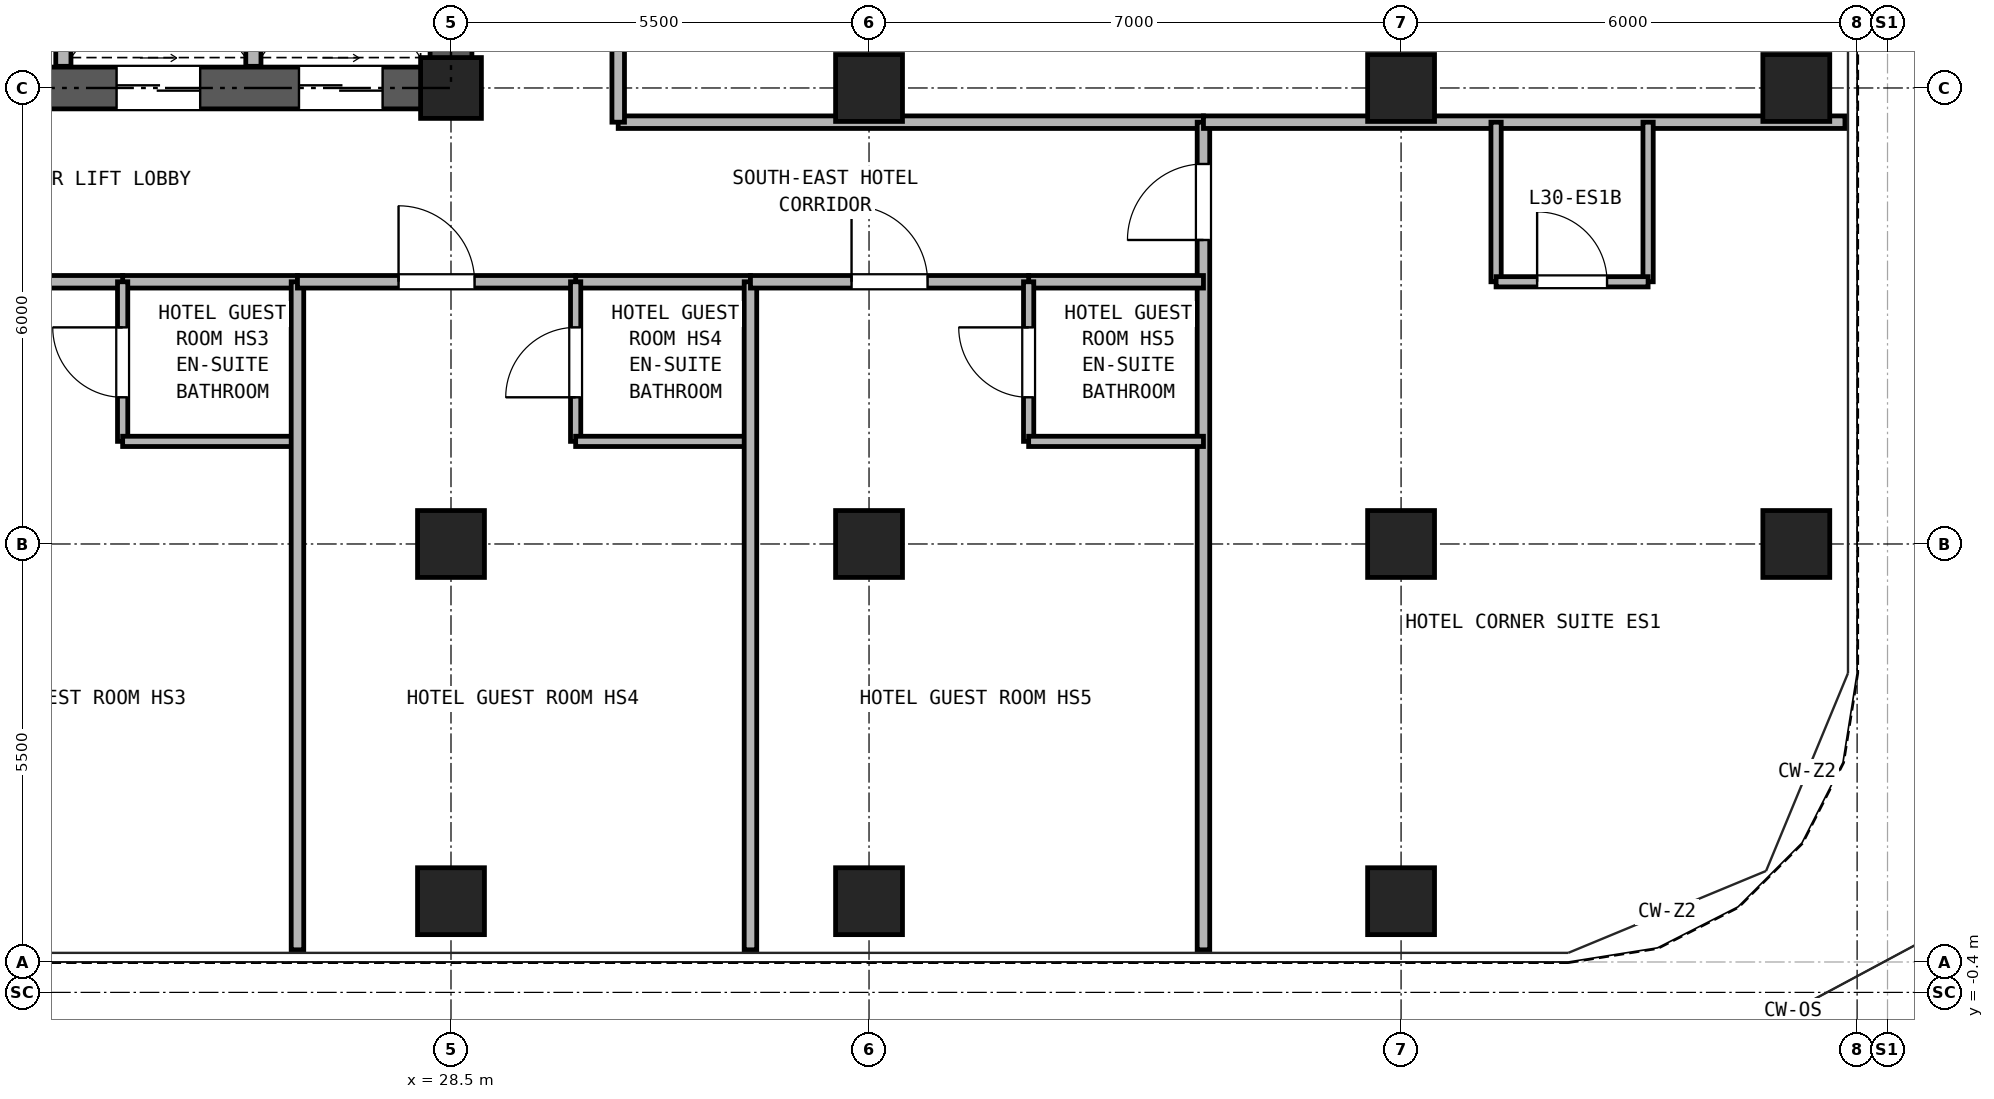
"""IFC4 building model, lengths in metres.
Left out: names, types, materials, properties, quantities, classifications, styles, units other than length and angle.
Written with IfcOpenShell. Run it as: python <this file> out.ifc"""

import sys

from ifc_helpers import new_model, si_unit, direction, frame, frame_2d, origin, origin_2d, place, context, subcontext, project, spatial, rectangle, hollow_rectangle, extrude, source, transform, mapped, element, fill, save


model = new_model("IFC4")
c1 = context("Model", 3, precision=1e-05, world=origin(), true_north=direction((0.0, 1.0)))
c2 = subcontext(c1, "Body", "Model", "MODEL_VIEW")
j1 = project(units=[si_unit("LENGTHUNIT", "METRE"), si_unit("PLANEANGLEUNIT", "RADIAN")], contexts=[c1])
p1 = place(None, origin())
s1 = spatial("IfcSite", under=j1, at=p1, CompositionType="ELEMENT")
p2 = place(p1, origin())
s2 = spatial("IfcBuilding", under=s1, at=p2, CompositionType="ELEMENT")
p3 = place(p2, frame((0.0, 0.0, 111.9)))
s3 = spatial("IfcBuildingStorey", under=s2, at=p3, CompositionType="ELEMENT", Elevation=111.9)
m1 = source(origin(), c2, "Body", "SweptSolid", [
    extrude(hollow_rectangle(XDim=0.88, YDim=0.88, WallThickness=0.05, at=origin_2d()), origin(), (0.0, 0.0, 1.0), 2.95),
])
for number, where, z_axis, x_axis in (
    (1, (28.5, 0.8, 0.0), (0.0, 0.0, 1.0), (1.0, 0.0, 0.0)),
    (2, (34.0, 0.8, 0.0), (0.0, 0.0, 1.0), (1.0, 0.0, 0.0)),
    (3, (41.0, 0.8, 0.0), (0.0, 0.0, 1.0), (1.0, 0.0, 0.0)),
    (4, (46.2, 5.5, 0.0), (0.0, 0.0, 1.0), (1.0, 0.0, 0.0)),
    (5, (46.2, 11.5, 0.0), (0.0, 0.0, 1.0), (1.0, 0.0, 0.0)),
    (6, (28.5, 5.5, 0.0), (0.0, 0.0, 1.0), (1.0, 0.0, 0.0)),
):
    element("IfcColumn", number, at=place(p3, frame(where, z_axis=z_axis, x_axis=x_axis)), inside=s3, PredefinedType="COLUMN", context=c2, shape_type="MappedRepresentation", body=[
        mapped(m1, transform((0.0, 0.0, 0.0), x_axis=(1.0, 0.0, 0.0), y_axis=(0.0, 1.0, 0.0), z_axis=(0.0, 0.0, 1.0), scale=1.0)),
    ])
m2 = source(origin(), c2, "Body", "SweptSolid", [
    extrude(hollow_rectangle(XDim=0.8, YDim=0.8, WallThickness=0.045, at=origin_2d()), origin(), (0.0, 0.0, 1.0), 2.95),
])
p4 = place(p3, frame((28.5, 11.5, 0.0), z_axis=(0.0, 0.0, 1.0), x_axis=(1.0, 0.0, 0.0)))
e7 = element("IfcColumn", 7, at=p4, inside=s3, PredefinedType="COLUMN", context=c2, shape_type="MappedRepresentation", body=[
    mapped(m2, transform((0.0, 0.0, 0.0), x_axis=(1.0, 0.0, 0.0), y_axis=(0.0, 1.0, 0.0), z_axis=(0.0, 0.0, 1.0), scale=1.0)),
])
for number, where, z_axis, x_axis in (
    (8, (34.0, 5.5, 0.0), (0.0, 0.0, 1.0), (1.0, 0.0, 0.0)),
    (9, (34.0, 11.5, 0.0), (0.0, 0.0, 1.0), (1.0, 0.0, 0.0)),
    (10, (41.0, 5.5, 0.0), (0.0, 0.0, 1.0), (1.0, 0.0, 0.0)),
    (11, (41.0, 11.5, 0.0), (0.0, 0.0, 1.0), (1.0, 0.0, 0.0)),
):
    element("IfcColumn", number, at=place(p3, frame(where, z_axis=z_axis, x_axis=x_axis)), inside=s3, PredefinedType="COLUMN", context=c2, shape_type="MappedRepresentation", body=[
        mapped(m1, transform((0.0, 0.0, 0.0), x_axis=(1.0, 0.0, 0.0), y_axis=(0.0, 1.0, 0.0), z_axis=(0.0, 0.0, 1.0), scale=1.0)),
    ])
p5 = place(p3, frame((18.225, 11.5, 0.0), z_axis=(0.0, 0.0, 1.0), x_axis=(1.0, 0.0, 0.0)))
e12 = element("IfcWall", 12, at=p5, inside=s3, PredefinedType="SHEAR", context=c2, shape_type="SweptSolid", body=[
    extrude(rectangle(XDim=10.55, YDim=0.55, at=frame_2d((5.275, 0.0))), origin(), (0.0, 0.0, 1.0), 2.95),
])
p6 = place(p5, frame((2.375, 0.0, 0.0)))
e13 = element("IfcOpeningElement", 13, at=p6, cuts=e12, PredefinedType="OPENING", context=c2, shape_type="SweptSolid", body=[
    extrude(rectangle(XDim=0.95, YDim=2.15, at=frame_2d((0.475, 1.075))), frame((0.0, 0.285, 0.0), z_axis=(0.0, -1.0, 0.0), x_axis=(1.0, 0.0, 0.0)), (0.0, 0.0, 1.0), 0.57),
])
p7 = place(p5, frame((5.875, 0.0, 0.0)))
e14 = element("IfcOpeningElement", 14, at=p7, cuts=e12, PredefinedType="OPENING", context=c2, shape_type="SweptSolid", body=[
    extrude(rectangle(XDim=1.1, YDim=2.25, at=frame_2d((0.55, 1.125))), frame((0.0, 0.285, 0.0), z_axis=(0.0, -1.0, 0.0), x_axis=(1.0, 0.0, 0.0)), (0.0, 0.0, 1.0), 0.57),
])
p8 = place(p5, frame((8.275, 0.0, 0.0)))
e15 = element("IfcOpeningElement", 15, at=p8, cuts=e12, PredefinedType="OPENING", context=c2, shape_type="SweptSolid", body=[
    extrude(rectangle(XDim=1.1, YDim=2.25, at=frame_2d((0.55, 1.125))), frame((0.0, 0.285, 0.0), z_axis=(0.0, -1.0, 0.0), x_axis=(1.0, 0.0, 0.0)), (0.0, 0.0, 1.0), 0.57),
])
p9 = place(p3, frame((28.5, 11.775, 0.0), z_axis=(0.0, 0.0, 1.0), x_axis=(0.0, 1.0, 0.0)))
e16 = element("IfcWall", 16, at=p9, inside=s3, PredefinedType="SHEAR", context=c2, shape_type="SweptSolid", body=[
    extrude(rectangle(XDim=16.7, YDim=0.55, at=frame_2d((8.35, 0.0))), origin(), (0.0, 0.0, 1.0), 2.95),
])
p10 = place(p9, frame((7.375, 0.0, 0.0)))
e17 = element("IfcOpeningElement", 17, at=p10, cuts=e16, PredefinedType="OPENING", context=c2, shape_type="SweptSolid", body=[
    extrude(rectangle(XDim=1.15, YDim=2.2, at=frame_2d((0.575, 1.1))), frame((0.0, 0.285, 0.0), z_axis=(0.0, -1.0, 0.0), x_axis=(1.0, 0.0, 0.0)), (0.0, 0.0, 1.0), 0.57),
])
for number, where, z_axis, x_axis in (
    (18, (23.4, 11.785, 0.0), (0.0, 0.0, 1.0), (0.0, 1.0, 0.0)),
    (19, (25.9, 11.785, 0.0), (0.0, 0.0, 1.0), (0.0, 1.0, 0.0)),
):
    element("IfcWall", number, at=place(p3, frame(where, z_axis=z_axis, x_axis=x_axis)), inside=s3, PredefinedType="PARTITIONING", context=c2, shape_type="SweptSolid", body=[
        extrude(rectangle(XDim=3.215, YDim=0.2, at=frame_2d((1.607, 0.0))), origin(), (0.0, 0.0, 1.0), 2.95),
    ])
p11 = place(p3, frame((30.7, 11.05, 0.0), z_axis=(0.0, 0.0, 1.0), x_axis=(1.0, 0.0, 0.0)))
e20 = element("IfcWall", 20, at=p11, inside=s3, PredefinedType="PARTITIONING", context=c2, shape_type="SweptSolid", body=[
    extrude(rectangle(XDim=7.7, YDim=0.165, at=frame_2d((3.85, 0.0))), origin(), (0.0, 0.0, 1.0), 2.95),
])
p12 = place(p3, frame((30.7, 11.05, 0.0), z_axis=(0.0, 0.0, 1.0), x_axis=(0.0, 1.0, 0.0)))
e21 = element("IfcWall", 21, at=p12, inside=s3, PredefinedType="PARTITIONING", context=c2, shape_type="SweptSolid", body=[
    extrude(rectangle(XDim=18.15, YDim=0.165, at=frame_2d((9.075, 0.0))), origin(), (0.0, 0.0, 1.0), 2.95),
])
p13 = place(p12, frame((8.575, 0.0, 0.0)))
e22 = element("IfcOpeningElement", 22, at=p13, cuts=e21, PredefinedType="OPENING", context=c2, shape_type="SweptSolid", body=[
    extrude(rectangle(XDim=0.95, YDim=2.15, at=frame_2d((0.475, 1.075))), frame((0.0, 0.093, 0.0), z_axis=(0.0, -1.0, 0.0), x_axis=(1.0, 0.0, 0.0)), (0.0, 0.0, 1.0), 0.185),
])
p14 = place(p3, frame((38.4, 0.16, 0.0), z_axis=(0.0, 0.0, 1.0), x_axis=(0.0, 1.0, 0.0)))
e23 = element("IfcWall", 23, at=p14, inside=s3, PredefinedType="PARTITIONING", context=c2, shape_type="SweptSolid", body=[
    extrude(rectangle(XDim=10.89, YDim=0.165, at=frame_2d((5.445, 0.0))), origin(), (0.0, 0.0, 1.0), 2.95),
])
p15 = place(p14, frame((9.34, 0.0, 0.0)))
e24 = element("IfcOpeningElement", 24, at=p15, cuts=e23, PredefinedType="OPENING", context=c2, shape_type="SweptSolid", body=[
    extrude(rectangle(XDim=1.0, YDim=2.15, at=frame_2d((0.5, 1.075))), frame((0.0, 0.093, 0.0), z_axis=(0.0, -1.0, 0.0), x_axis=(1.0, 0.0, 0.0)), (0.0, 0.0, 1.0), 0.185),
])
p16 = place(p3, frame((38.4, 11.05, 0.0), z_axis=(0.0, 0.0, 1.0), x_axis=(1.0, 0.0, 0.0)))
e25 = element("IfcWall", 25, at=p16, inside=s3, PredefinedType="PARTITIONING", context=c2, shape_type="SweptSolid", body=[
    extrude(rectangle(XDim=8.44, YDim=0.165, at=frame_2d((4.22, 0.0))), origin(), (0.0, 0.0, 1.0), 2.95),
])
for number, where, z_axis, x_axis in (
    (26, (42.25, 8.95, 0.0), (0.0, 0.0, 1.0), (0.0, 1.0, 0.0)),
    (27, (44.25, 8.95, 0.0), (0.0, 0.0, 1.0), (0.0, 1.0, 0.0)),
):
    element("IfcWall", number, at=place(p3, frame(where, z_axis=z_axis, x_axis=x_axis)), inside=s3, PredefinedType="PARTITIONING", context=c2, shape_type="SweptSolid", body=[
        extrude(rectangle(XDim=2.1, YDim=0.135, at=frame_2d((1.05, 0.0))), origin(), (0.0, 0.0, 1.0), 2.95),
    ])
p17 = place(p3, frame((42.25, 8.95, 0.0), z_axis=(0.0, 0.0, 1.0), x_axis=(1.0, 0.0, 0.0)))
e28 = element("IfcWall", 28, at=p17, inside=s3, PredefinedType="PARTITIONING", context=c2, shape_type="SweptSolid", body=[
    extrude(rectangle(XDim=2.0, YDim=0.135, at=frame_2d((1.0, 0.0))), origin(), (0.0, 0.0, 1.0), 2.95),
])
p18 = place(p17, frame((0.54, 0.0, 0.0)))
e29 = element("IfcOpeningElement", 29, at=p18, cuts=e28, PredefinedType="OPENING", context=c2, shape_type="SweptSolid", body=[
    extrude(rectangle(XDim=0.92, YDim=2.1, at=frame_2d((0.46, 1.05))), frame((0.0, 0.077, 0.0), z_axis=(0.0, -1.0, 0.0), x_axis=(1.0, 0.0, 0.0)), (0.0, 0.0, 1.0), 0.155),
])
p19 = place(p3, frame((24.18, 8.95, 0.0), z_axis=(0.0, 0.0, 1.0), x_axis=(1.0, 0.0, 0.0)))
e30 = element("IfcWall", 30, at=p19, inside=s3, PredefinedType="PARTITIONING", context=c2, shape_type="SweptSolid", body=[
    extrude(rectangle(XDim=2.3, YDim=0.165, at=frame_2d((1.15, 0.0))), origin(), (0.0, 0.0, 1.0), 2.95),
])
p20 = place(p3, frame((20.52, 8.95, 0.0), z_axis=(0.0, 0.0, 1.0), x_axis=(1.0, 0.0, 0.0)))
e31 = element("IfcWall", 31, at=p20, inside=s3, PredefinedType="PARTITIONING", context=c2, shape_type="SweptSolid", body=[
    extrude(rectangle(XDim=3.66, YDim=0.165, at=frame_2d((1.83, 0.0))), origin(), (0.0, 0.0, 1.0), 2.95),
])
p21 = place(p20, frame((1.33, 0.0, 0.0)))
e32 = element("IfcOpeningElement", 32, at=p21, cuts=e31, PredefinedType="OPENING", context=c2, shape_type="SweptSolid", body=[
    extrude(rectangle(XDim=1.0, YDim=2.15, at=frame_2d((0.5, 1.075))), frame((0.0, 0.093, 0.0), z_axis=(0.0, -1.0, 0.0), x_axis=(1.0, 0.0, 0.0)), (0.0, 0.0, 1.0), 0.185),
])
p22 = place(p3, frame((24.18, 6.85, 0.0), z_axis=(0.0, 0.0, 1.0), x_axis=(0.0, 1.0, 0.0)))
e33 = element("IfcWall", 33, at=p22, inside=s3, PredefinedType="PARTITIONING", context=c2, shape_type="SweptSolid", body=[
    extrude(rectangle(XDim=2.1, YDim=0.135, at=frame_2d((1.05, 0.0))), origin(), (0.0, 0.0, 1.0), 2.95),
])
p23 = place(p22, frame((0.58, 0.0, 0.0)))
e34 = element("IfcOpeningElement", 34, at=p23, cuts=e33, PredefinedType="OPENING", context=c2, shape_type="SweptSolid", body=[
    extrude(rectangle(XDim=0.92, YDim=2.1, at=frame_2d((0.46, 1.05))), frame((0.0, 0.077, 0.0), z_axis=(0.0, -1.0, 0.0), x_axis=(1.0, 0.0, 0.0)), (0.0, 0.0, 1.0), 0.155),
])
p24 = place(p3, frame((24.18, 6.85, 0.0), z_axis=(0.0, 0.0, 1.0), x_axis=(1.0, 0.0, 0.0)))
e35 = element("IfcWall", 35, at=p24, inside=s3, PredefinedType="PARTITIONING", context=c2, shape_type="SweptSolid", body=[
    extrude(rectangle(XDim=2.3, YDim=0.135, at=frame_2d((1.15, 0.0))), origin(), (0.0, 0.0, 1.0), 2.95),
])
p25 = place(p3, frame((26.48, 0.16, 0.0), z_axis=(0.0, 0.0, 1.0), x_axis=(0.0, 1.0, 0.0)))
e36 = element("IfcWall", 36, at=p25, inside=s3, PredefinedType="PARTITIONING", context=c2, shape_type="SweptSolid", body=[
    extrude(rectangle(XDim=8.79, YDim=0.165, at=frame_2d((4.395, 0.0))), origin(), (0.0, 0.0, 1.0), 2.95),
])
p26 = place(p3, frame((30.14, 8.95, 0.0), z_axis=(0.0, 0.0, 1.0), x_axis=(1.0, 0.0, 0.0)))
e37 = element("IfcWall", 37, at=p26, inside=s3, PredefinedType="PARTITIONING", context=c2, shape_type="SweptSolid", body=[
    extrude(rectangle(XDim=2.3, YDim=0.165, at=frame_2d((1.15, 0.0))), origin(), (0.0, 0.0, 1.0), 2.95),
])
p27 = place(p3, frame((26.48, 8.95, 0.0), z_axis=(0.0, 0.0, 1.0), x_axis=(1.0, 0.0, 0.0)))
e38 = element("IfcWall", 38, at=p27, inside=s3, PredefinedType="PARTITIONING", context=c2, shape_type="SweptSolid", body=[
    extrude(rectangle(XDim=3.66, YDim=0.165, at=frame_2d((1.83, 0.0))), origin(), (0.0, 0.0, 1.0), 2.95),
])
p28 = place(p27, frame((1.33, 0.0, 0.0)))
e39 = element("IfcOpeningElement", 39, at=p28, cuts=e38, PredefinedType="OPENING", context=c2, shape_type="SweptSolid", body=[
    extrude(rectangle(XDim=1.0, YDim=2.15, at=frame_2d((0.5, 1.075))), frame((0.0, 0.093, 0.0), z_axis=(0.0, -1.0, 0.0), x_axis=(1.0, 0.0, 0.0)), (0.0, 0.0, 1.0), 0.185),
])
p29 = place(p3, frame((30.14, 6.85, 0.0), z_axis=(0.0, 0.0, 1.0), x_axis=(0.0, 1.0, 0.0)))
e40 = element("IfcWall", 40, at=p29, inside=s3, PredefinedType="PARTITIONING", context=c2, shape_type="SweptSolid", body=[
    extrude(rectangle(XDim=2.1, YDim=0.135, at=frame_2d((1.05, 0.0))), origin(), (0.0, 0.0, 1.0), 2.95),
])
p30 = place(p29, frame((0.58, 0.0, 0.0)))
e41 = element("IfcOpeningElement", 41, at=p30, cuts=e40, PredefinedType="OPENING", context=c2, shape_type="SweptSolid", body=[
    extrude(rectangle(XDim=0.92, YDim=2.1, at=frame_2d((0.46, 1.05))), frame((0.0, 0.077, 0.0), z_axis=(0.0, -1.0, 0.0), x_axis=(1.0, 0.0, 0.0)), (0.0, 0.0, 1.0), 0.155),
])
p31 = place(p3, frame((30.14, 6.85, 0.0), z_axis=(0.0, 0.0, 1.0), x_axis=(1.0, 0.0, 0.0)))
e42 = element("IfcWall", 42, at=p31, inside=s3, PredefinedType="PARTITIONING", context=c2, shape_type="SweptSolid", body=[
    extrude(rectangle(XDim=2.3, YDim=0.135, at=frame_2d((1.15, 0.0))), origin(), (0.0, 0.0, 1.0), 2.95),
])
p32 = place(p3, frame((32.44, 0.16, 0.0), z_axis=(0.0, 0.0, 1.0), x_axis=(0.0, 1.0, 0.0)))
e43 = element("IfcWall", 43, at=p32, inside=s3, PredefinedType="PARTITIONING", context=c2, shape_type="SweptSolid", body=[
    extrude(rectangle(XDim=8.79, YDim=0.165, at=frame_2d((4.395, 0.0))), origin(), (0.0, 0.0, 1.0), 2.95),
])
p33 = place(p3, frame((36.1, 8.95, 0.0), z_axis=(0.0, 0.0, 1.0), x_axis=(1.0, 0.0, 0.0)))
e44 = element("IfcWall", 44, at=p33, inside=s3, PredefinedType="PARTITIONING", context=c2, shape_type="SweptSolid", body=[
    extrude(rectangle(XDim=2.3, YDim=0.165, at=frame_2d((1.15, 0.0))), origin(), (0.0, 0.0, 1.0), 2.95),
])
p34 = place(p3, frame((32.44, 8.95, 0.0), z_axis=(0.0, 0.0, 1.0), x_axis=(1.0, 0.0, 0.0)))
e45 = element("IfcWall", 45, at=p34, inside=s3, PredefinedType="PARTITIONING", context=c2, shape_type="SweptSolid", body=[
    extrude(rectangle(XDim=3.66, YDim=0.165, at=frame_2d((1.83, 0.0))), origin(), (0.0, 0.0, 1.0), 2.95),
])
p35 = place(p34, frame((1.33, 0.0, 0.0)))
e46 = element("IfcOpeningElement", 46, at=p35, cuts=e45, PredefinedType="OPENING", context=c2, shape_type="SweptSolid", body=[
    extrude(rectangle(XDim=1.0, YDim=2.15, at=frame_2d((0.5, 1.075))), frame((0.0, 0.093, 0.0), z_axis=(0.0, -1.0, 0.0), x_axis=(1.0, 0.0, 0.0)), (0.0, 0.0, 1.0), 0.185),
])
p36 = place(p3, frame((36.1, 6.85, 0.0), z_axis=(0.0, 0.0, 1.0), x_axis=(0.0, 1.0, 0.0)))
e47 = element("IfcWall", 47, at=p36, inside=s3, PredefinedType="PARTITIONING", context=c2, shape_type="SweptSolid", body=[
    extrude(rectangle(XDim=2.1, YDim=0.135, at=frame_2d((1.05, 0.0))), origin(), (0.0, 0.0, 1.0), 2.95),
])
p37 = place(p36, frame((0.58, 0.0, 0.0)))
e48 = element("IfcOpeningElement", 48, at=p37, cuts=e47, PredefinedType="OPENING", context=c2, shape_type="SweptSolid", body=[
    extrude(rectangle(XDim=0.92, YDim=2.1, at=frame_2d((0.46, 1.05))), frame((0.0, 0.077, 0.0), z_axis=(0.0, -1.0, 0.0), x_axis=(1.0, 0.0, 0.0)), (0.0, 0.0, 1.0), 0.155),
])
p38 = place(p3, frame((36.1, 6.85, 0.0), z_axis=(0.0, 0.0, 1.0), x_axis=(1.0, 0.0, 0.0)))
e49 = element("IfcWall", 49, at=p38, inside=s3, PredefinedType="PARTITIONING", context=c2, shape_type="SweptSolid", body=[
    extrude(rectangle(XDim=2.3, YDim=0.135, at=frame_2d((1.15, 0.0))), origin(), (0.0, 0.0, 1.0), 2.95),
])
p39 = place(p7, frame((1.1, 0.0, 0.0), z_axis=(0.0, 0.0, 1.0), x_axis=(-1.0, 0.0, 0.0)))
e50 = element("IfcDoor", 50, at=p39, inside=s3, OperationType="DOUBLE_DOOR_SLIDING", PredefinedType="DOOR", context=c2, shape_type="SweptSolid", body=[
    extrude(rectangle(XDim=1.1, YDim=2.25, at=frame_2d((0.55, 1.125))), frame((0.0, 0.025, 0.0), z_axis=(0.0, -1.0, 0.0), x_axis=(1.0, 0.0, 0.0)), (0.0, 0.0, 1.0), 0.05),
])
fill(e14, e50)
p40 = place(p8, frame((1.1, 0.0, 0.0), z_axis=(0.0, 0.0, 1.0), x_axis=(-1.0, 0.0, 0.0)))
e51 = element("IfcDoor", 51, at=p40, inside=s3, OperationType="DOUBLE_DOOR_SLIDING", PredefinedType="DOOR", context=c2, shape_type="SweptSolid", body=[
    extrude(rectangle(XDim=1.1, YDim=2.25, at=frame_2d((0.55, 1.125))), frame((0.0, 0.025, 0.0), z_axis=(0.0, -1.0, 0.0), x_axis=(1.0, 0.0, 0.0)), (0.0, 0.0, 1.0), 0.05),
])
fill(e15, e51)
p41 = place(p18, origin())
e52 = element("IfcDoor", 52, at=p41, inside=s3, OperationType="SINGLE_SWING_LEFT", PredefinedType="DOOR", context=c2, shape_type="SweptSolid", body=[
    extrude(rectangle(XDim=0.92, YDim=2.1, at=frame_2d((0.46, 1.05))), frame((0.0, 0.025, 0.0), z_axis=(0.0, -1.0, 0.0), x_axis=(1.0, 0.0, 0.0)), (0.0, 0.0, 1.0), 0.05),
])
fill(e29, e52)
p42 = place(p15, frame((1.0, 0.0, 0.0), z_axis=(0.0, 0.0, 1.0), x_axis=(-1.0, 0.0, 0.0)))
e53 = element("IfcDoor", 53, at=p42, inside=s3, OperationType="SINGLE_SWING_LEFT", PredefinedType="DOOR", context=c2, shape_type="SweptSolid", body=[
    extrude(rectangle(XDim=1.0, YDim=2.15, at=frame_2d((0.5, 1.075))), frame((0.0, 0.025, 0.0), z_axis=(0.0, -1.0, 0.0), x_axis=(1.0, 0.0, 0.0)), (0.0, 0.0, 1.0), 0.05),
])
fill(e24, e53)
p43 = place(p23, origin())
e54 = element("IfcDoor", 54, at=p43, inside=s3, OperationType="SINGLE_SWING_RIGHT", PredefinedType="DOOR", context=c2, shape_type="SweptSolid", body=[
    extrude(rectangle(XDim=0.92, YDim=2.1, at=frame_2d((0.46, 1.05))), frame((0.0, 0.025, 0.0), z_axis=(0.0, -1.0, 0.0), x_axis=(1.0, 0.0, 0.0)), (0.0, 0.0, 1.0), 0.05),
])
fill(e34, e54)
p44 = place(p30, origin())
e55 = element("IfcDoor", 55, at=p44, inside=s3, OperationType="SINGLE_SWING_LEFT", PredefinedType="DOOR", context=c2, shape_type="SweptSolid", body=[
    extrude(rectangle(XDim=0.92, YDim=2.1, at=frame_2d((0.46, 1.05))), frame((0.0, 0.025, 0.0), z_axis=(0.0, -1.0, 0.0), x_axis=(1.0, 0.0, 0.0)), (0.0, 0.0, 1.0), 0.05),
])
fill(e41, e55)
p45 = place(p28, frame((1.0, 0.0, 0.0), z_axis=(0.0, 0.0, 1.0), x_axis=(-1.0, 0.0, 0.0)))
e56 = element("IfcDoor", 56, at=p45, inside=s3, OperationType="SINGLE_SWING_LEFT", PredefinedType="DOOR", context=c2, shape_type="SweptSolid", body=[
    extrude(rectangle(XDim=1.0, YDim=2.15, at=frame_2d((0.5, 1.075))), frame((0.0, 0.025, 0.0), z_axis=(0.0, -1.0, 0.0), x_axis=(1.0, 0.0, 0.0)), (0.0, 0.0, 1.0), 0.05),
])
fill(e39, e56)
p46 = place(p37, origin())
e57 = element("IfcDoor", 57, at=p46, inside=s3, OperationType="SINGLE_SWING_RIGHT", PredefinedType="DOOR", context=c2, shape_type="SweptSolid", body=[
    extrude(rectangle(XDim=0.92, YDim=2.1, at=frame_2d((0.46, 1.05))), frame((0.0, 0.025, 0.0), z_axis=(0.0, -1.0, 0.0), x_axis=(1.0, 0.0, 0.0)), (0.0, 0.0, 1.0), 0.05),
])
fill(e48, e57)
p47 = place(p35, frame((1.0, 0.0, 0.0), z_axis=(0.0, 0.0, 1.0), x_axis=(-1.0, 0.0, 0.0)))
e58 = element("IfcDoor", 58, at=p47, inside=s3, OperationType="SINGLE_SWING_LEFT", PredefinedType="DOOR", context=c2, shape_type="SweptSolid", body=[
    extrude(rectangle(XDim=1.0, YDim=2.15, at=frame_2d((0.5, 1.075))), frame((0.0, 0.025, 0.0), z_axis=(0.0, -1.0, 0.0), x_axis=(1.0, 0.0, 0.0)), (0.0, 0.0, 1.0), 0.05),
])
fill(e46, e58)
save(model, sys.argv[1])
